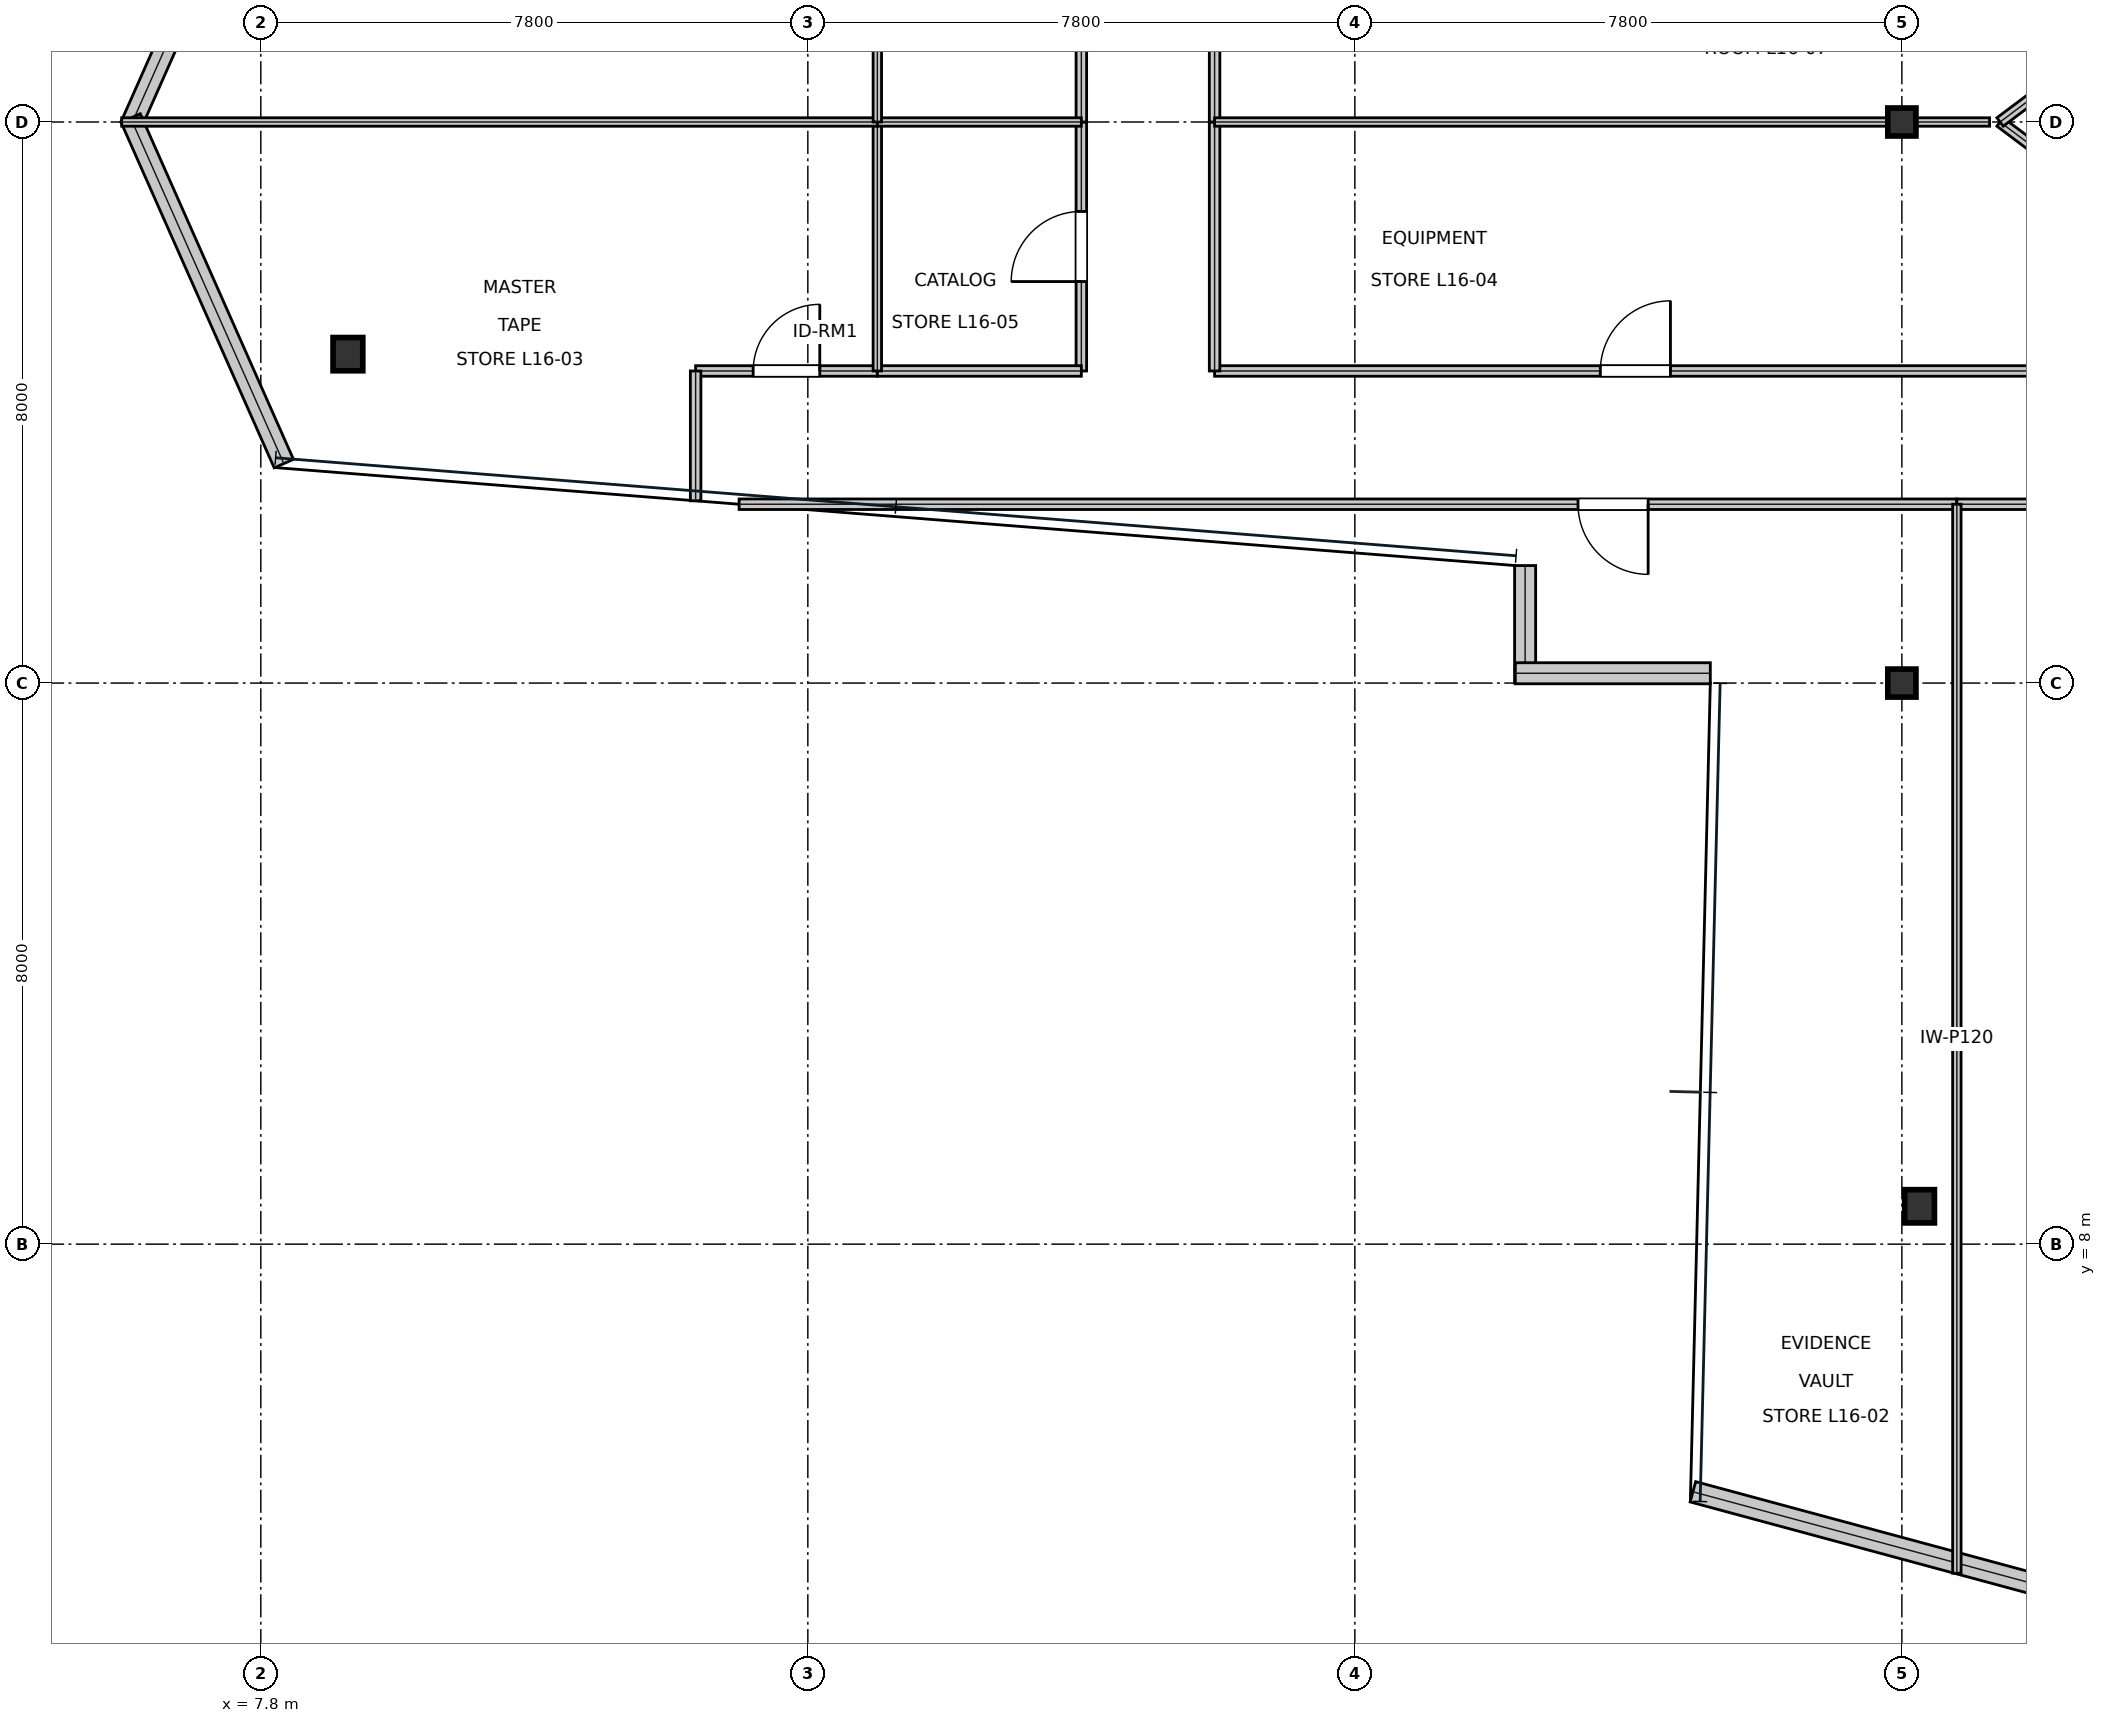
"""IFC4 building model, lengths in metres.
Left out: names, types, materials, properties, quantities, classifications, styles, units other than length and angle.
Written with IfcOpenShell. Run it as: python <this file> out.ifc"""

import sys

from ifc_helpers import new_model, si_unit, direction, frame, frame_2d, origin, origin_2d, place, context, subcontext, project, spatial, rectangle, i_section, extrude, element, fill, save


model = new_model("IFC4")
c1 = context("Model", 3, precision=1e-05, world=origin(), true_north=direction((0.0, 1.0)))
c2 = subcontext(c1, "Body", "Model", "MODEL_VIEW")
j1 = project(units=[si_unit("LENGTHUNIT", "METRE"), si_unit("PLANEANGLEUNIT", "RADIAN")], contexts=[c1])
p1 = place(None, origin())
s1 = spatial("IfcSite", under=j1, at=p1, CompositionType="ELEMENT")
p2 = place(p1, origin())
s2 = spatial("IfcBuilding", under=s1, at=p2, CompositionType="ELEMENT")
p3 = place(p2, frame((0.0, 0.0, 74.25)))
s3 = spatial("IfcBuildingStorey", under=s2, at=p3, CompositionType="ELEMENT", Elevation=74.25)
for number, where, z_axis, x_axis in (
    (1, (31.2, 16.0, 0.0), (0.0, 0.0, 1.0), (1.0, 0.0, 0.0)),
    (2, (31.2, 24.0, 0.0), (0.0, 0.0, 1.0), (1.0, 0.0, 0.0)),
):
    element("IfcColumn", number, at=place(p3, frame(where, z_axis=z_axis, x_axis=x_axis)), inside=s3, PredefinedType="COLUMN", context=c2, shape_type="SweptSolid", body=[
        extrude(i_section(OverallWidth=0.401, OverallDepth=0.399, WebThickness=0.025, FlangeThickness=0.04, at=origin_2d()), origin(), (0.0, 0.0, 1.0), 4.044),
    ])
for number, where, z_axis, x_axis in (
    (3, (9.042, 20.69, 0.016), (0.0, 0.0, 1.0), (1.0, 0.0, 0.0)),
    (4, (31.452, 8.54, 0.016), (0.0, 0.0, 1.0), (1.0, 0.0, 0.0)),
):
    element("IfcColumn", number, at=place(p3, frame(where, z_axis=z_axis, x_axis=x_axis)), inside=s3, PredefinedType="COLUMN", context=c2, shape_type="SweptSolid", body=[
        extrude(i_section(OverallWidth=0.424, OverallDepth=0.474, WebThickness=0.048, FlangeThickness=0.077, at=origin_2d()), origin(), (0.0, 0.0, 1.0), 4.018),
    ])
for number, where, z_axis, x_axis in (
    (5, (8.128, 28.87, 0.0), (0.0, 0.0, 1.0), (-0.405, -0.914, 0.0)),
    (6, (5.944, 24.057, 0.0), (0.0, 0.0, 1.0), (0.405, -0.914, 0.0)),
):
    element("IfcWall", number, at=place(p3, frame(where, z_axis=z_axis, x_axis=x_axis)), inside=s3, PredefinedType="STANDARD", context=c2, shape_type="SweptSolid", body=[
        extrude(rectangle(XDim=5.389, YDim=0.3, at=frame_2d((2.695, 0.0))), origin(), (0.0, 0.0, 1.0), 3.81),
    ])
p4 = place(p3, frame((25.828, 17.675, 0.0), z_axis=(0.0, 0.0, 1.0), x_axis=(0.0, -1.0, 0.0)))
e7 = element("IfcWall", 7, at=p4, inside=s3, PredefinedType="STANDARD", context=c2, shape_type="SweptSolid", body=[
    extrude(rectangle(XDim=1.675, YDim=0.3, at=frame_2d((0.838, 0.0))), origin(), (0.0, 0.0, 1.0), 3.338),
])
p5 = place(p3, frame((25.688, 16.14, 0.0), z_axis=(0.0, 0.0, 1.0), x_axis=(1.0, 0.0, 0.0)))
e8 = element("IfcWall", 8, at=p5, inside=s3, PredefinedType="STANDARD", context=c2, shape_type="SweptSolid", body=[
    extrude(rectangle(XDim=2.781, YDim=0.3, at=frame_2d((1.39, 0.0))), origin(), (0.0, 0.0, 1.0), 3.81),
])
p6 = place(p3, frame((28.22, 4.469, 0.0), z_axis=(0.0, 0.0, 1.0), x_axis=(0.965438319853, -0.260631637679, 0.0)))
e9 = element("IfcWall", 9, at=p6, inside=s3, PredefinedType="STANDARD", context=c2, shape_type="SweptSolid", body=[
    extrude(rectangle(XDim=6.983, YDim=0.3, at=frame_2d((3.492, 0.0))), origin(), (0.0, 0.0, 1.0), 3.81),
])
p7 = place(p3, frame((14.62, 18.55, 0.0), z_axis=(0.0, 0.0, 1.0), x_axis=(1.0, 0.0, 0.0)))
e10 = element("IfcWall", 10, at=p7, inside=s3, PredefinedType="PARTITIONING", context=c2, shape_type="SweptSolid", body=[
    extrude(rectangle(XDim=17.364, YDim=0.15, at=frame_2d((8.682, 0.0))), origin(), (0.0, 0.0, 1.0), 3.181),
])
p8 = place(p7, frame((11.962, 0.0, 0.0)))
e11 = element("IfcOpeningElement", 11, at=p8, cuts=e10, PredefinedType="OPENING", context=c2, shape_type="SweptSolid", body=[
    extrude(rectangle(XDim=1.0, YDim=2.15, at=frame_2d((0.5, 1.075))), frame((0.0, 0.085, 0.0), z_axis=(0.0, -1.0, 0.0), x_axis=(1.0, 0.0, 0.0)), (0.0, 0.0, 1.0), 0.17),
])
p9 = place(p3, frame((14.0, 20.45, 0.0), z_axis=(0.0, 0.0, 1.0), x_axis=(1.0, 0.0, 0.0)))
e12 = element("IfcWall", 12, at=p9, inside=s3, PredefinedType="PARTITIONING", context=c2, shape_type="SweptSolid", body=[
    extrude(rectangle(XDim=2.591, YDim=0.15, at=frame_2d((1.295, 0.0))), origin(), (0.0, 0.0, 1.0), 3.391),
])
p10 = place(p9, frame((0.821, 0.0, 0.0)))
e13 = element("IfcOpeningElement", 13, at=p10, cuts=e12, PredefinedType="OPENING", context=c2, shape_type="SweptSolid", body=[
    extrude(rectangle(XDim=0.95, YDim=2.15, at=frame_2d((0.475, 1.075))), frame((0.0, 0.085, 0.0), z_axis=(0.0, -1.0, 0.0), x_axis=(1.0, 0.0, 0.0)), (0.0, 0.0, 1.0), 0.17),
])
p11 = place(p3, frame((21.4, 20.45, 0.0), z_axis=(0.0, 0.0, 1.0), x_axis=(1.0, 0.0, 0.0)))
e14 = element("IfcWall", 14, at=p11, inside=s3, PredefinedType="PARTITIONING", context=c2, shape_type="SweptSolid", body=[
    extrude(rectangle(XDim=12.0, YDim=0.15, at=frame_2d((6.0, 0.0))), origin(), (0.0, 0.0, 1.0), 3.181),
])
p12 = place(p11, frame((5.5, 0.0, 0.0)))
e15 = element("IfcOpeningElement", 15, at=p12, cuts=e14, PredefinedType="OPENING", context=c2, shape_type="SweptSolid", body=[
    extrude(rectangle(XDim=1.0, YDim=2.15, at=frame_2d((0.5, 1.075))), frame((0.0, 0.085, 0.0), z_axis=(0.0, -1.0, 0.0), x_axis=(1.0, 0.0, 0.0)), (0.0, 0.0, 1.0), 0.17),
])
p13 = place(p3, frame((19.5, 20.45, 0.0), z_axis=(0.0, 0.0, 1.0), x_axis=(0.0, 1.0, 0.0)))
e16 = element("IfcWall", 16, at=p13, inside=s3, PredefinedType="PARTITIONING", context=c2, shape_type="SweptSolid", body=[
    extrude(rectangle(XDim=3.55, YDim=0.15, at=frame_2d((1.775, 0.0))), origin(), (0.0, 0.0, 1.0), 3.181),
])
p14 = place(p13, frame((1.275, 0.0, 0.0)))
e17 = element("IfcOpeningElement", 17, at=p14, cuts=e16, PredefinedType="OPENING", context=c2, shape_type="SweptSolid", body=[
    extrude(rectangle(XDim=1.0, YDim=2.15, at=frame_2d((0.5, 1.075))), frame((0.0, 0.085, 0.0), z_axis=(0.0, -1.0, 0.0), x_axis=(1.0, 0.0, 0.0)), (0.0, 0.0, 1.0), 0.17),
])
p15 = place(p3, frame((19.5, 24.0, 0.0), z_axis=(0.0, 0.0, 1.0), x_axis=(0.0, 1.0, 0.0)))
e18 = element("IfcWall", 18, at=p15, inside=s3, PredefinedType="PARTITIONING", context=c2, shape_type="SweptSolid", body=[
    extrude(rectangle(XDim=3.55, YDim=0.15, at=frame_2d((1.775, 0.0))), origin(), (0.0, 0.0, 1.0), 3.181),
])
p16 = place(p15, frame((1.275, 0.0, 0.0)))
e19 = element("IfcOpeningElement", 19, at=p16, cuts=e18, PredefinedType="OPENING", context=c2, shape_type="SweptSolid", body=[
    extrude(rectangle(XDim=1.0, YDim=2.15, at=frame_2d((0.5, 1.075))), frame((0.0, 0.085, 0.0), z_axis=(0.0, -1.0, 0.0), x_axis=(1.0, 0.0, 0.0)), (0.0, 0.0, 1.0), 0.17),
])
p17 = place(p3, frame((31.984, 18.55, 0.0), z_axis=(0.0, 0.0, 1.0), x_axis=(1.0, 0.0, 0.0)))
e20 = element("IfcWall", 20, at=p17, inside=s3, PredefinedType="PARTITIONING", context=c2, shape_type="SweptSolid", body=[
    extrude(rectangle(XDim=1.416, YDim=0.15, at=frame_2d((0.708, 0.0))), origin(), (0.0, 0.0, 1.0), 3.81),
])
p18 = place(p3, frame((14.0, 18.599, 0.0), z_axis=(0.0, 0.0, 1.0), x_axis=(0.0, 1.0, 0.0)))
e21 = element("IfcWall", 21, at=p18, inside=s3, PredefinedType="PARTITIONING", context=c2, shape_type="SweptSolid", body=[
    extrude(rectangle(XDim=1.851, YDim=0.15, at=frame_2d((0.925, 0.0))), origin(), (0.0, 0.0, 1.0), 3.338),
])
p19 = place(p3, frame((21.4, 20.45, 0.0), z_axis=(0.0, 0.0, 1.0), x_axis=(0.0, 1.0, 0.0)))
e22 = element("IfcWall", 22, at=p19, inside=s3, PredefinedType="PARTITIONING", context=c2, shape_type="SweptSolid", body=[
    extrude(rectangle(XDim=3.55, YDim=0.15, at=frame_2d((1.775, 0.0))), origin(), (0.0, 0.0, 1.0), 3.181),
])
p20 = place(p3, frame((16.591, 20.45, 0.0), z_axis=(0.0, 0.0, 1.0), x_axis=(1.0, 0.0, 0.0)))
e23 = element("IfcWall", 23, at=p20, inside=s3, PredefinedType="PARTITIONING", context=c2, shape_type="SweptSolid", body=[
    extrude(rectangle(XDim=2.909, YDim=0.15, at=frame_2d((1.455, 0.0))), origin(), (0.0, 0.0, 1.0), 3.81),
])
p21 = place(p3, frame((21.4, 24.0, 0.0), z_axis=(0.0, 0.0, 1.0), x_axis=(0.0, 1.0, 0.0)))
e24 = element("IfcWall", 24, at=p21, inside=s3, PredefinedType="PARTITIONING", context=c2, shape_type="SweptSolid", body=[
    extrude(rectangle(XDim=3.55, YDim=0.15, at=frame_2d((1.775, 0.0))), origin(), (0.0, 0.0, 1.0), 3.181),
])
p22 = place(p3, frame((31.984, 3.308, 0.0), z_axis=(0.0, 0.0, 1.0), x_axis=(0.0, 1.0, 0.0)))
e25 = element("IfcWall", 25, at=p22, inside=s3, PredefinedType="PARTITIONING", context=c2, shape_type="SweptSolid", body=[
    extrude(rectangle(XDim=15.242, YDim=0.12, at=frame_2d((7.621, 0.0))), origin(), (0.0, 0.0, 1.0), 3.181),
])
p23 = place(p3, frame((16.591, 20.45, 0.0), z_axis=(0.0, 0.0, 1.0), x_axis=(0.0, 1.0, 0.0)))
e26 = element("IfcWall", 26, at=p23, inside=s3, PredefinedType="PARTITIONING", context=c2, shape_type="SweptSolid", body=[
    extrude(rectangle(XDim=3.55, YDim=0.12, at=frame_2d((1.775, 0.0))), origin(), (0.0, 0.0, 1.0), 3.181),
])
p24 = place(p3, frame((5.816, 24.0, 0.0), z_axis=(0.0, 0.0, 1.0), x_axis=(1.0, 0.0, 0.0)))
e27 = element("IfcWall", 27, at=p24, inside=s3, PredefinedType="PARTITIONING", context=c2, shape_type="SweptSolid", body=[
    extrude(rectangle(XDim=10.775, YDim=0.12, at=frame_2d((5.388, 0.0))), origin(), (0.0, 0.0, 1.0), 3.338),
])
p25 = place(p3, frame((21.4, 24.0, 0.0), z_axis=(0.0, 0.0, 1.0), x_axis=(1.0, 0.0, 0.0)))
e28 = element("IfcWall", 28, at=p25, inside=s3, PredefinedType="PARTITIONING", context=c2, shape_type="SweptSolid", body=[
    extrude(rectangle(XDim=11.05, YDim=0.12, at=frame_2d((5.525, 0.0))), origin(), (0.0, 0.0, 1.0), 3.181),
])
p26 = place(p3, frame((16.591, 24.0, 0.0), z_axis=(0.0, 0.0, 1.0), x_axis=(1.0, 0.0, 0.0)))
e29 = element("IfcWall", 29, at=p26, inside=s3, PredefinedType="PARTITIONING", context=c2, shape_type="SweptSolid", body=[
    extrude(rectangle(XDim=2.909, YDim=0.12, at=frame_2d((1.455, 0.0))), origin(), (0.0, 0.0, 1.0), 3.391),
])
p27 = place(p3, frame((16.591, 24.0, 0.0), z_axis=(0.0, 0.0, 1.0), x_axis=(0.0, 1.0, 0.0)))
e30 = element("IfcWall", 30, at=p27, inside=s3, PredefinedType="PARTITIONING", context=c2, shape_type="SweptSolid", body=[
    extrude(rectangle(XDim=3.55, YDim=0.12, at=frame_2d((1.775, 0.0))), origin(), (0.0, 0.0, 1.0), 3.181),
])
for number, where, z_axis, x_axis in (
    (31, (32.6, 24.0, 0.0), (0.0, 0.0, 1.0), (0.8, -0.6, 0.0)),
    (32, (36.6, 27.0, 0.0), (0.0, 0.0, 1.0), (-0.8, -0.6, 0.0)),
):
    element("IfcWall", number, at=place(p3, frame(where, z_axis=z_axis, x_axis=x_axis)), inside=s3, PredefinedType="MOVABLE", context=c2, shape_type="SweptSolid", body=[
        extrude(rectangle(XDim=5.0, YDim=0.15, at=frame_2d((2.5, 0.0))), origin(), (0.0, 0.0, 1.0), 3.81),
    ])
p28 = place(p8, frame((1.0, 0.0, 0.0), z_axis=(0.0, 0.0, 1.0), x_axis=(-1.0, 0.0, 0.0)))
e33 = element("IfcDoor", 33, at=p28, inside=s3, OperationType="SINGLE_SWING_LEFT", PredefinedType="DOOR", context=c2, shape_type="SweptSolid", body=[
    extrude(rectangle(XDim=1.0, YDim=2.15, at=frame_2d((0.5, 1.075))), frame((0.0, 0.025, 0.0), z_axis=(0.0, -1.0, 0.0), x_axis=(1.0, 0.0, 0.0)), (0.0, 0.0, 1.0), 0.05),
])
fill(e11, e33)
p29 = place(p10, origin())
e34 = element("IfcDoor", 34, at=p29, inside=s3, OperationType="SINGLE_SWING_RIGHT", PredefinedType="DOOR", context=c2, shape_type="SweptSolid", body=[
    extrude(rectangle(XDim=0.95, YDim=2.15, at=frame_2d((0.475, 1.075))), frame((0.0, 0.025, 0.0), z_axis=(0.0, -1.0, 0.0), x_axis=(1.0, 0.0, 0.0)), (0.0, 0.0, 1.0), 0.05),
])
fill(e13, e34)
p30 = place(p12, origin())
e35 = element("IfcDoor", 35, at=p30, inside=s3, OperationType="SINGLE_SWING_RIGHT", PredefinedType="DOOR", context=c2, shape_type="SweptSolid", body=[
    extrude(rectangle(XDim=1.0, YDim=2.15, at=frame_2d((0.5, 1.075))), frame((0.0, 0.025, 0.0), z_axis=(0.0, -1.0, 0.0), x_axis=(1.0, 0.0, 0.0)), (0.0, 0.0, 1.0), 0.05),
])
fill(e15, e35)
p31 = place(p14, origin())
e36 = element("IfcDoor", 36, at=p31, inside=s3, OperationType="SINGLE_SWING_LEFT", PredefinedType="DOOR", context=c2, shape_type="SweptSolid", body=[
    extrude(rectangle(XDim=1.0, YDim=2.15, at=frame_2d((0.5, 1.075))), frame((0.0, 0.025, 0.0), z_axis=(0.0, -1.0, 0.0), x_axis=(1.0, 0.0, 0.0)), (0.0, 0.0, 1.0), 0.05),
])
fill(e17, e36)
save(model, sys.argv[1])
